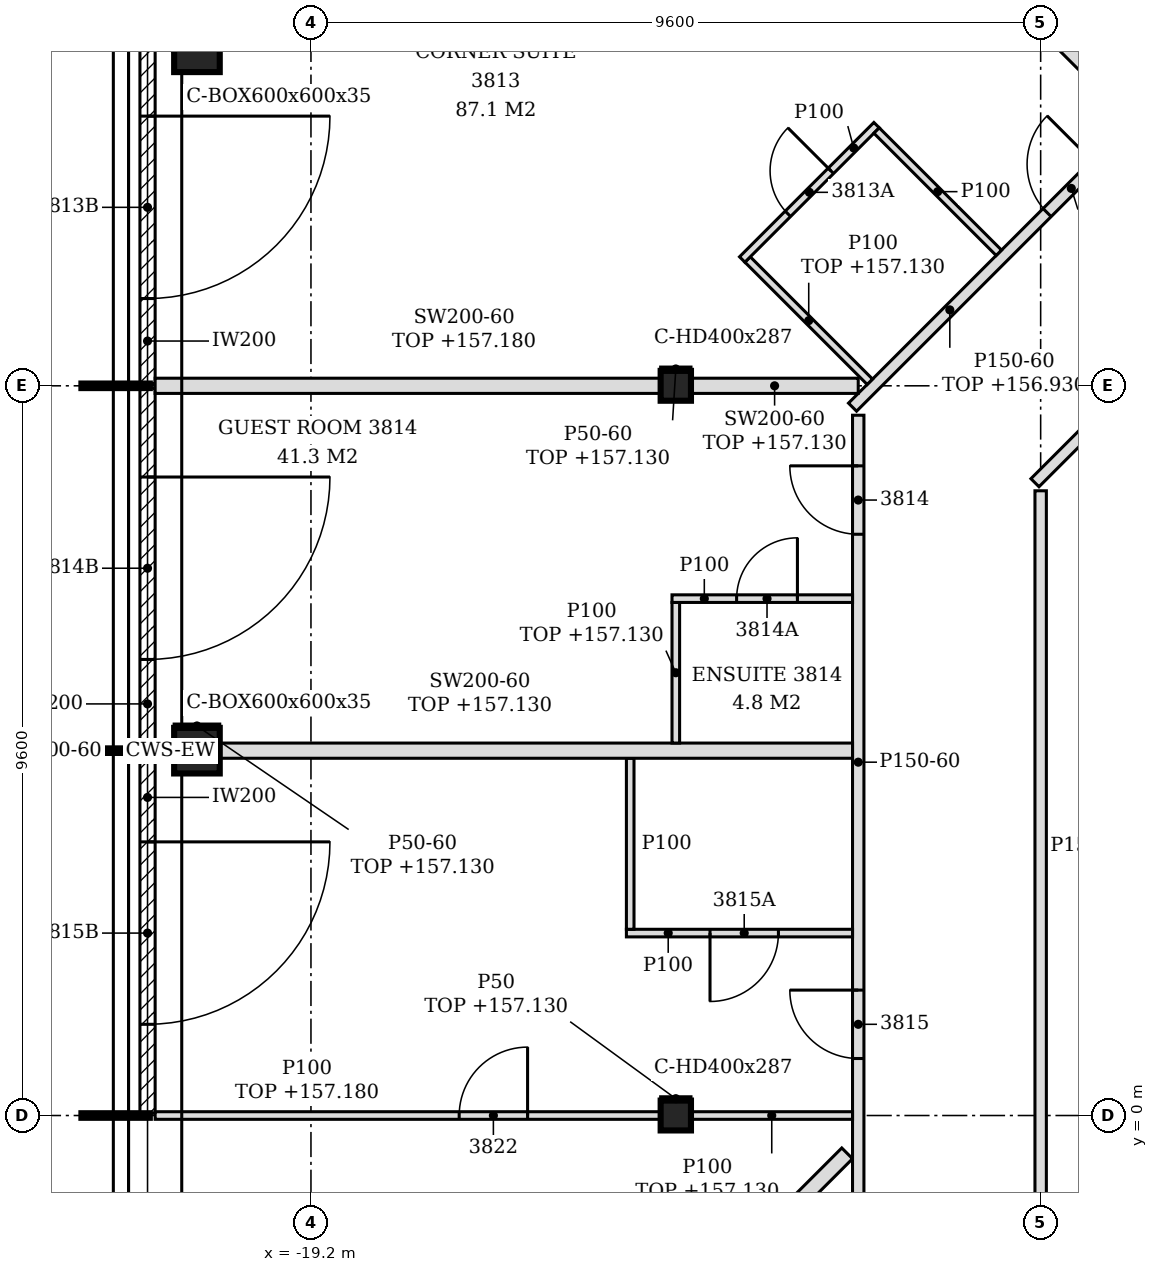
"""IFC4 building model, lengths in metres.
Left out: names, types, materials, properties, quantities, classifications, styles, units other than length and angle.
Written with IfcOpenShell. Run it as: python <this file> out.ifc"""

import sys

from ifc_helpers import new_model, si_unit, direction, frame, frame_2d, origin, origin_2d, place, context, subcontext, project, spatial, polyline, rectangle, hollow_rectangle, i_section, outline, extrude, element, fill, save


model = new_model("IFC4")
c1 = context("Model", 3, precision=1e-05, world=origin(), true_north=direction((0.0, 1.0)))
c2 = subcontext(c1, "Body", "Model", "MODEL_VIEW")
j1 = project(units=[si_unit("LENGTHUNIT", "METRE"), si_unit("PLANEANGLEUNIT", "RADIAN")], contexts=[c1])
p1 = place(None, origin())
s1 = spatial("IfcSite", under=j1, at=p1, CompositionType="ELEMENT")
p2 = place(p1, origin())
s2 = spatial("IfcBuilding", under=s1, at=p2, CompositionType="ELEMENT")
p3 = place(p2, frame((0.0, 0.0, 154.2)))
s3 = spatial("IfcBuildingStorey", under=s2, at=p3, CompositionType="ELEMENT", Elevation=154.2)
for number, where, z_axis, x_axis in (
    (1, (-20.7, 14.027, -0.15), (0.0, 0.0, 1.0), (1.0, 0.0, 0.0)),
    (2, (-20.7, 4.8, -0.15), (0.0, 0.0, 1.0), (1.0, 0.0, 0.0)),
):
    element("IfcColumn", number, at=place(p3, frame(where, z_axis=z_axis, x_axis=x_axis)), inside=s3, PredefinedType="COLUMN", context=c2, shape_type="SweptSolid", body=[
        extrude(hollow_rectangle(XDim=0.6, YDim=0.6, WallThickness=0.035, at=origin_2d()), origin(), (0.0, 0.0, 1.0), 3.6),
    ])
for number, where, z_axis, x_axis in (
    (3, (-14.4, 0.0, -0.15), (0.0, 0.0, 1.0), (1.0, 0.0, 0.0)),
    (4, (-14.4, 9.6, -0.15), (0.0, 0.0, 1.0), (1.0, 0.0, 0.0)),
):
    element("IfcColumn", number, at=place(p3, frame(where, z_axis=z_axis, x_axis=x_axis)), inside=s3, PredefinedType="COLUMN", context=c2, shape_type="SweptSolid", body=[
        extrude(i_section(OverallWidth=0.399, OverallDepth=0.393, WebThickness=0.023, FlangeThickness=0.037, FilletRadius=0.015, at=origin_2d()), origin(), (0.0, 0.0, 1.0), 3.6),
    ])
p4 = place(p3, frame((-21.35, 14.256, 0.0), z_axis=(0.0, 0.0, 1.0), x_axis=(0.0, -1.0, 0.0)))
e5 = element("IfcWall", 5, at=p4, inside=s3, PredefinedType="NOTDEFINED", context=c2, shape_type="SweptSolid", body=[
    extrude(rectangle(XDim=4.626, YDim=0.2, at=frame_2d((2.313, 0.0))), origin(), (0.0, 0.0, 1.0), 3.45),
])
p5 = place(p4, frame((1.108, 0.0, 0.0)))
e6 = element("IfcOpeningElement", 6, at=p5, cuts=e5, PredefinedType="OPENING", context=c2, shape_type="SweptSolid", body=[
    extrude(rectangle(XDim=2.4, YDim=2.4, at=frame_2d((1.2, 1.2))), frame((0.0, 0.11, 0.0), z_axis=(0.0, -1.0, 0.0), x_axis=(1.0, 0.0, 0.0)), (0.0, 0.0, 1.0), 0.22),
])
p6 = place(p3, frame((-21.35, 9.57, 0.0), z_axis=(0.0, 0.0, 1.0), x_axis=(0.0, -1.0, 0.0)))
e7 = element("IfcWall", 7, at=p6, inside=s3, PredefinedType="NOTDEFINED", context=c2, shape_type="SweptSolid", body=[
    extrude(rectangle(XDim=4.74, YDim=0.2, at=frame_2d((2.37, 0.0))), origin(), (0.0, 0.0, 1.0), 3.45),
])
p7 = place(p6, frame((1.17, 0.0, 0.0)))
e8 = element("IfcOpeningElement", 8, at=p7, cuts=e7, PredefinedType="OPENING", context=c2, shape_type="SweptSolid", body=[
    extrude(rectangle(XDim=2.4, YDim=2.4, at=frame_2d((1.2, 1.2))), frame((0.0, 0.11, 0.0), z_axis=(0.0, -1.0, 0.0), x_axis=(1.0, 0.0, 0.0)), (0.0, 0.0, 1.0), 0.22),
])
p8 = place(p3, frame((-21.35, 4.77, 0.0), z_axis=(0.0, 0.0, 1.0), x_axis=(0.0, -1.0, 0.0)))
e9 = element("IfcWall", 9, at=p8, inside=s3, PredefinedType="NOTDEFINED", context=c2, shape_type="SweptSolid", body=[
    extrude(rectangle(XDim=4.74, YDim=0.2, at=frame_2d((2.37, 0.0))), origin(), (0.0, 0.0, 1.0), 3.45),
])
p9 = place(p8, frame((1.17, 0.0, 0.0)))
e10 = element("IfcOpeningElement", 10, at=p9, cuts=e9, PredefinedType="OPENING", context=c2, shape_type="SweptSolid", body=[
    extrude(rectangle(XDim=2.4, YDim=2.4, at=frame_2d((1.2, 1.2))), frame((0.0, 0.11, 0.0), z_axis=(0.0, -1.0, 0.0), x_axis=(1.0, 0.0, 0.0)), (0.0, 0.0, 1.0), 0.22),
])
p10 = place(p3, frame((-18.755, -7.107, 0.0), z_axis=(0.0, 0.0, 1.0), x_axis=(0.707106781187, 0.707106781187, 0.0)))
e11 = element("IfcWall", 11, at=p10, inside=s3, PredefinedType="PARTITIONING", context=c2, shape_type="SweptSolid", body=[
    extrude(rectangle(XDim=9.347, YDim=0.2, at=frame_2d((4.674, 0.0))), origin(), (0.0, 0.0, 1.0), 2.93),
])
p11 = place(p3, frame((-12.0, -4.7, 0.0), z_axis=(0.0, 0.0, 1.0), x_axis=(0.0, 1.0, 0.0)))
e12 = element("IfcWall", 12, at=p11, inside=s3, PredefinedType="PARTITIONING", context=c2, shape_type="SweptSolid", body=[
    extrude(outline(polyline([(0.0, 0.0), (13.913, 0.0), (13.913, 3.45), (9.6, 3.45), (9.598, 2.93), (9.4, 2.93), (9.398, 3.45), (4.8, 3.45), (4.798, 2.93), (4.6, 2.93), (4.598, 3.45), (0.0, 3.45), (0.0, 0.0)])), frame((0.0, 0.075, 0.0), z_axis=(0.0, -1.0, 0.0), x_axis=(1.0, 0.0, 0.0)), (0.0, 0.0, 1.0), 0.15),
])
p12 = place(p11, frame((12.347, 0.0, 0.0)))
e13 = element("IfcOpeningElement", 13, at=p12, cuts=e12, PredefinedType="OPENING", context=c2, shape_type="SweptSolid", body=[
    extrude(rectangle(XDim=0.9, YDim=2.1, at=frame_2d((0.45, 1.05))), frame((0.0, 0.085, 0.0), z_axis=(0.0, -1.0, 0.0), x_axis=(1.0, 0.0, 0.0)), (0.0, 0.0, 1.0), 0.17),
])
p13 = place(p11, frame((5.45, 0.0, 0.0)))
e14 = element("IfcOpeningElement", 14, at=p13, cuts=e12, PredefinedType="OPENING", context=c2, shape_type="SweptSolid", body=[
    extrude(rectangle(XDim=0.9, YDim=2.1, at=frame_2d((0.45, 1.05))), frame((0.0, 0.085, 0.0), z_axis=(0.0, -1.0, 0.0), x_axis=(1.0, 0.0, 0.0)), (0.0, 0.0, 1.0), 0.17),
])
p14 = place(p11, frame((1.777, 0.0, 0.0)))
e15 = element("IfcOpeningElement", 15, at=p14, cuts=e12, PredefinedType="OPENING", context=c2, shape_type="SweptSolid", body=[
    extrude(rectangle(XDim=0.9, YDim=2.1, at=frame_2d((0.45, 1.05))), frame((0.0, 0.085, 0.0), z_axis=(0.0, -1.0, 0.0), x_axis=(1.0, 0.0, 0.0)), (0.0, 0.0, 1.0), 0.17),
])
p15 = place(p3, frame((-9.6, -1.125, 0.0), z_axis=(0.0, 0.0, 1.0), x_axis=(0.0, 1.0, 0.0)))
e16 = element("IfcWall", 16, at=p15, inside=s3, PredefinedType="PARTITIONING", context=c2, shape_type="SweptSolid", body=[
    extrude(outline(polyline([(0.0, 0.0), (9.344, 0.0), (9.344, 3.45), (6.025, 3.45), (6.023, 2.93), (5.825, 2.93), (5.823, 3.45), (1.225, 3.45), (1.223, 2.93), (1.025, 2.93), (1.023, 3.45), (0.0, 3.45), (0.0, 0.0)])), frame((0.0, 0.075, 0.0), z_axis=(0.0, -1.0, 0.0), x_axis=(1.0, 0.0, 0.0)), (0.0, 0.0, 1.0), 0.15),
])
p16 = place(p3, frame((-21.25, 0.0, 0.0), z_axis=(0.0, 0.0, 1.0), x_axis=(1.0, 0.0, 0.0)))
e17 = element("IfcWall", 17, at=p16, inside=s3, PredefinedType="PARTITIONING", context=c2, shape_type="SweptSolid", body=[
    extrude(outline(polyline([(0.0, 0.0), (6.65, 0.0), (6.65, 2.98), (0.7, 2.98), (0.698, 2.93), (0.4, 2.93), (0.398, 2.98), (0.0, 2.98), (0.0, 0.0)])), frame((0.0, 0.05, 0.0), z_axis=(0.0, -1.0, 0.0), x_axis=(1.0, 0.0, 0.0)), (0.0, 0.0, 1.0), 0.1),
])
p17 = place(p16, frame((4.0, 0.0, 0.0)))
e18 = element("IfcOpeningElement", 18, at=p17, cuts=e17, PredefinedType="OPENING", context=c2, shape_type="SweptSolid", body=[
    extrude(rectangle(XDim=0.9, YDim=2.1, at=frame_2d((0.45, 1.05))), frame((0.0, 0.06, 0.0), z_axis=(0.0, -1.0, 0.0), x_axis=(1.0, 0.0, 0.0)), (0.0, 0.0, 1.0), 0.12),
])
p18 = place(p3, frame((-14.2, 0.0, 0.0), z_axis=(0.0, 0.0, 1.0), x_axis=(1.0, 0.0, 0.0)))
e19 = element("IfcWall", 19, at=p18, inside=s3, PredefinedType="PARTITIONING", context=c2, shape_type="SweptSolid", body=[
    extrude(rectangle(XDim=2.125, YDim=0.1, at=frame_2d((1.063, 0.0))), origin(), (0.0, 0.0, 1.0), 2.93),
])
p19 = place(p3, frame((-15.05, 2.4, 0.0), z_axis=(0.0, 0.0, 1.0), x_axis=(1.0, 0.0, 0.0)))
e20 = element("IfcWall", 20, at=p19, inside=s3, PredefinedType="PARTITIONING", context=c2, shape_type="SweptSolid", body=[
    extrude(outline(polyline([(0.0, 0.0), (2.975, 0.0), (2.975, 3.45), (0.8, 3.45), (0.798, 2.93), (0.5, 2.93), (0.498, 3.45), (0.0, 3.45), (0.0, 0.0)])), frame((0.0, 0.05, 0.0), z_axis=(0.0, -1.0, 0.0), x_axis=(1.0, 0.0, 0.0)), (0.0, 0.0, 1.0), 0.1),
])
p20 = place(p19, frame((1.1, 0.0, 0.0)))
e21 = element("IfcOpeningElement", 21, at=p20, cuts=e20, PredefinedType="OPENING", context=c2, shape_type="SweptSolid", body=[
    extrude(rectangle(XDim=0.9, YDim=2.1, at=frame_2d((0.45, 1.05))), frame((0.0, 0.06, 0.0), z_axis=(0.0, -1.0, 0.0), x_axis=(1.0, 0.0, 0.0)), (0.0, 0.0, 1.0), 0.12),
])
p21 = place(p3, frame((-15.0, 2.45, 0.0), z_axis=(0.0, 0.0, 1.0), x_axis=(0.0, 1.0, 0.0)))
e22 = element("IfcWall", 22, at=p21, inside=s3, PredefinedType="PARTITIONING", context=c2, shape_type="SweptSolid", body=[
    extrude(rectangle(XDim=2.25, YDim=0.1, at=frame_2d((1.125, 0.0))), origin(), (0.0, 0.0, 1.0), 3.45),
])
p22 = place(p3, frame((-21.25, 4.8, 0.0), z_axis=(0.0, 0.0, 1.0), x_axis=(1.0, 0.0, 0.0)))
e23 = element("IfcWall", 23, at=p22, inside=s3, PredefinedType="PARTITIONING", context=c2, shape_type="SweptSolid", body=[
    extrude(rectangle(XDim=0.25, YDim=0.2, at=frame_2d((0.125, 0.0))), origin(), (0.0, 0.0, 1.0), 3.45),
])
p23 = place(p3, frame((-20.4, 4.8, 0.0), z_axis=(0.0, 0.0, 1.0), x_axis=(1.0, 0.0, 0.0)))
e24 = element("IfcWall", 24, at=p23, inside=s3, PredefinedType="PARTITIONING", context=c2, shape_type="SweptSolid", body=[
    extrude(rectangle(XDim=8.325, YDim=0.2, at=frame_2d((4.163, 0.0))), origin(), (0.0, 0.0, 1.0), 2.93),
])
p24 = place(p3, frame((-14.4, 4.9, 0.0), z_axis=(0.0, 0.0, 1.0), x_axis=(0.0, 1.0, 0.0)))
e25 = element("IfcWall", 25, at=p24, inside=s3, PredefinedType="PARTITIONING", context=c2, shape_type="SweptSolid", body=[
    extrude(rectangle(XDim=1.85, YDim=0.1, at=frame_2d((0.925, 0.0))), origin(), (0.0, 0.0, 1.0), 2.93),
])
p25 = place(p3, frame((-14.45, 6.8, 0.0), z_axis=(0.0, 0.0, 1.0), x_axis=(1.0, 0.0, 0.0)))
e26 = element("IfcWall", 26, at=p25, inside=s3, PredefinedType="PARTITIONING", context=c2, shape_type="SweptSolid", body=[
    extrude(outline(polyline([(0.0, 0.0), (2.375, 0.0), (2.375, 3.45), (0.2, 3.45), (0.198, 2.93), (0.0, 2.93), (0.0, 0.0)])), frame((0.0, 0.05, 0.0), z_axis=(0.0, -1.0, 0.0), x_axis=(1.0, 0.0, 0.0)), (0.0, 0.0, 1.0), 0.1),
])
p26 = place(p25, frame((0.85, 0.0, 0.0)))
e27 = element("IfcOpeningElement", 27, at=p26, cuts=e26, PredefinedType="OPENING", context=c2, shape_type="SweptSolid", body=[
    extrude(rectangle(XDim=0.8, YDim=2.1, at=frame_2d((0.4, 1.05))), frame((0.0, 0.06, 0.0), z_axis=(0.0, -1.0, 0.0), x_axis=(1.0, 0.0, 0.0)), (0.0, 0.0, 1.0), 0.12),
])
p27 = place(p3, frame((-9.675, 8.325, 0.0), z_axis=(0.0, 0.0, 1.0), x_axis=(0.707106781187, 0.707106781187, 0.0)))
e28 = element("IfcWall", 28, at=p27, inside=s3, PredefinedType="PARTITIONING", context=c2, shape_type="SweptSolid", body=[
    extrude(rectangle(XDim=6.614, YDim=0.15, at=frame_2d((3.307, 0.0))), origin(), (0.0, 0.0, 1.0), 2.93),
])
p28 = place(p3, frame((-12.075, 9.319, 0.0), z_axis=(0.0, 0.0, 1.0), x_axis=(0.707106781187, 0.707106781187, 0.0)))
e29 = element("IfcWall", 29, at=p28, inside=s3, PredefinedType="PARTITIONING", context=c2, shape_type="SweptSolid", body=[
    extrude(rectangle(XDim=13.793, YDim=0.15, at=frame_2d((6.896, 0.0))), origin(), (0.0, 0.0, 1.0), 2.73),
])
p29 = place(p28, frame((11.692, 0.0, 0.0)))
e30 = element("IfcOpeningElement", 30, at=p29, cuts=e29, PredefinedType="OPENING", context=c2, shape_type="SweptSolid", body=[
    extrude(rectangle(XDim=0.9, YDim=2.1, at=frame_2d((0.45, 1.05))), frame((0.0, 0.085, 0.0), z_axis=(0.0, -1.0, 0.0), x_axis=(1.0, 0.0, 0.0)), (0.0, 0.0, 1.0), 0.17),
])
p30 = place(p28, frame((7.376, 0.0, 0.0)))
e31 = element("IfcOpeningElement", 31, at=p30, cuts=e29, PredefinedType="OPENING", context=c2, shape_type="SweptSolid", body=[
    extrude(rectangle(XDim=0.9, YDim=2.1, at=frame_2d((0.45, 1.05))), frame((0.0, 0.085, 0.0), z_axis=(0.0, -1.0, 0.0), x_axis=(1.0, 0.0, 0.0)), (0.0, 0.0, 1.0), 0.17),
])
p31 = place(p28, frame((3.62, 0.0, 0.0)))
e32 = element("IfcOpeningElement", 32, at=p31, cuts=e29, PredefinedType="OPENING", context=c2, shape_type="SweptSolid", body=[
    extrude(rectangle(XDim=0.9, YDim=2.1, at=frame_2d((0.45, 1.05))), frame((0.0, 0.085, 0.0), z_axis=(0.0, -1.0, 0.0), x_axis=(1.0, 0.0, 0.0)), (0.0, 0.0, 1.0), 0.17),
])
p32 = place(p3, frame((-21.25, 9.6, 0.0), z_axis=(0.0, 0.0, 1.0), x_axis=(1.0, 0.0, 0.0)))
e33 = element("IfcWall", 33, at=p32, inside=s3, PredefinedType="PARTITIONING", context=c2, shape_type="SweptSolid", body=[
    extrude(outline(polyline([(0.0, 0.0), (6.65, 0.0), (6.65, 2.98), (0.7, 2.98), (0.698, 2.93), (0.4, 2.93), (0.398, 2.98), (0.0, 2.98), (0.0, 0.0)])), frame((0.0, 0.1, 0.0), z_axis=(0.0, -1.0, 0.0), x_axis=(1.0, 0.0, 0.0)), (0.0, 0.0, 1.0), 0.2),
])
p33 = place(p3, frame((-14.2, 9.6, 0.0), z_axis=(0.0, 0.0, 1.0), x_axis=(1.0, 0.0, 0.0)))
e34 = element("IfcWall", 34, at=p33, inside=s3, PredefinedType="PARTITIONING", context=c2, shape_type="SweptSolid", body=[
    extrude(rectangle(XDim=2.2, YDim=0.2, at=frame_2d((1.1, 0.0))), origin(), (0.0, 0.0, 1.0), 2.93),
])
p34 = place(p3, frame((-11.847, 9.653, 0.0), z_axis=(0.0, 0.0, 1.0), x_axis=(-0.707106781187, 0.707106781187, 0.0)))
e35 = element("IfcWall", 35, at=p34, inside=s3, PredefinedType="PARTITIONING", context=c2, shape_type="SweptSolid", body=[
    extrude(rectangle(XDim=2.275, YDim=0.1, at=frame_2d((1.137, 0.0))), origin(), (0.0, 0.0, 1.0), 2.93),
])
p35 = place(p3, frame((-13.526, 11.262, 0.0), z_axis=(0.0, 0.0, 1.0), x_axis=(0.707106781187, 0.707106781187, 0.0)))
e36 = element("IfcWall", 36, at=p35, inside=s3, PredefinedType="PARTITIONING", context=c2, shape_type="SweptSolid", body=[
    extrude(rectangle(XDim=2.5, YDim=0.1, at=frame_2d((1.25, 0.0))), origin(), (0.0, 0.0, 1.0), 3.45),
])
p36 = place(p35, frame((0.85, 0.0, 0.0)))
e37 = element("IfcOpeningElement", 37, at=p36, cuts=e36, PredefinedType="OPENING", context=c2, shape_type="SweptSolid", body=[
    extrude(rectangle(XDim=0.8, YDim=2.1, at=frame_2d((0.4, 1.05))), frame((0.0, 0.06, 0.0), z_axis=(0.0, -1.0, 0.0), x_axis=(1.0, 0.0, 0.0)), (0.0, 0.0, 1.0), 0.12),
])
p37 = place(p3, frame((-10.15, 11.35, 0.0), z_axis=(0.0, 0.0, 1.0), x_axis=(-0.707160441348, 0.707053116953, 0.0)))
e38 = element("IfcWall", 38, at=p37, inside=s3, PredefinedType="PARTITIONING", context=c2, shape_type="SweptSolid", body=[
    extrude(rectangle(XDim=2.275, YDim=0.1, at=frame_2d((1.137, 0.0))), origin(), (0.0, 0.0, 1.0), 3.45),
])
p38 = place(p3, frame((-8.35, 13.15, 0.0), z_axis=(0.0, 0.0, 1.0), x_axis=(-0.707092030896, 0.707121531169, 0.0)))
e39 = element("IfcWall", 39, at=p38, inside=s3, PredefinedType="PARTITIONING", context=c2, shape_type="SweptSolid", body=[
    extrude(rectangle(XDim=8.276, YDim=0.2, at=frame_2d((4.138, 0.0))), origin(), (0.0, 0.0, 1.0), 2.93),
])
p39 = place(p3, frame((-14.6, 0.221, 0.0), z_axis=(0.0, 0.0, 1.0), x_axis=(1.0, 0.0, 0.0)))
e40 = element("IfcWall", 40, at=p39, inside=s3, PredefinedType="PARTITIONING", context=c2, shape_type="SweptSolid", body=[
    extrude(rectangle(XDim=0.399, YDim=0.05, at=frame_2d((0.2, 0.0))), origin(), (0.0, 0.0, 1.0), 2.93),
])
p40 = place(p3, frame((-21.0, 5.125, 0.0), z_axis=(0.0, 0.0, 1.0), x_axis=(1.0, 0.0, 0.0)))
e41 = element("IfcWall", 41, at=p40, inside=s3, PredefinedType="PARTITIONING", context=c2, shape_type="SweptSolid", body=[
    extrude(rectangle(XDim=0.6, YDim=0.05, at=frame_2d((0.3, 0.0))), origin(), (0.0, 0.0, 1.0), 2.93),
])
p41 = place(p3, frame((-14.6, 9.822, 0.0), z_axis=(0.0, 0.0, 1.0), x_axis=(1.0, 0.0, 0.0)))
e42 = element("IfcWall", 42, at=p41, inside=s3, PredefinedType="PARTITIONING", context=c2, shape_type="SweptSolid", body=[
    extrude(rectangle(XDim=0.399, YDim=0.05, at=frame_2d((0.2, 0.0))), origin(), (0.0, 0.0, 1.0), 2.93),
])
p42 = place(p5, origin())
e43 = element("IfcDoor", 43, at=p42, inside=s3, OperationType="SINGLE_SWING_LEFT", PredefinedType="DOOR", context=c2, shape_type="SweptSolid", body=[
    extrude(rectangle(XDim=2.4, YDim=2.4, at=frame_2d((1.2, 1.2))), frame((0.0, 0.025, 0.0), z_axis=(0.0, -1.0, 0.0), x_axis=(1.0, 0.0, 0.0)), (0.0, 0.0, 1.0), 0.05),
])
fill(e6, e43)
p43 = place(p7, origin())
e44 = element("IfcDoor", 44, at=p43, inside=s3, OperationType="SINGLE_SWING_LEFT", PredefinedType="DOOR", context=c2, shape_type="SweptSolid", body=[
    extrude(rectangle(XDim=2.4, YDim=2.4, at=frame_2d((1.2, 1.2))), frame((0.0, 0.025, 0.0), z_axis=(0.0, -1.0, 0.0), x_axis=(1.0, 0.0, 0.0)), (0.0, 0.0, 1.0), 0.05),
])
fill(e8, e44)
p44 = place(p9, origin())
e45 = element("IfcDoor", 45, at=p44, inside=s3, OperationType="SINGLE_SWING_LEFT", PredefinedType="DOOR", context=c2, shape_type="SweptSolid", body=[
    extrude(rectangle(XDim=2.4, YDim=2.4, at=frame_2d((1.2, 1.2))), frame((0.0, 0.025, 0.0), z_axis=(0.0, -1.0, 0.0), x_axis=(1.0, 0.0, 0.0)), (0.0, 0.0, 1.0), 0.05),
])
fill(e10, e45)
p45 = place(p31, origin())
e46 = element("IfcDoor", 46, at=p45, inside=s3, OperationType="SINGLE_SWING_RIGHT", PredefinedType="DOOR", context=c2, shape_type="SweptSolid", body=[
    extrude(rectangle(XDim=0.9, YDim=2.1, at=frame_2d((0.45, 1.05))), frame((0.0, 0.025, 0.0), z_axis=(0.0, -1.0, 0.0), x_axis=(1.0, 0.0, 0.0)), (0.0, 0.0, 1.0), 0.05),
])
fill(e32, e46)
p46 = place(p36, origin())
e47 = element("IfcDoor", 47, at=p46, inside=s3, OperationType="SINGLE_SWING_RIGHT", PredefinedType="DOOR", context=c2, shape_type="SweptSolid", body=[
    extrude(rectangle(XDim=0.8, YDim=2.1, at=frame_2d((0.4, 1.05))), frame((0.0, 0.025, 0.0), z_axis=(0.0, -1.0, 0.0), x_axis=(1.0, 0.0, 0.0)), (0.0, 0.0, 1.0), 0.05),
])
fill(e37, e47)
p47 = place(p12, origin())
e48 = element("IfcDoor", 48, at=p47, inside=s3, OperationType="SINGLE_SWING_RIGHT", PredefinedType="DOOR", context=c2, shape_type="SweptSolid", body=[
    extrude(rectangle(XDim=0.9, YDim=2.1, at=frame_2d((0.45, 1.05))), frame((0.0, 0.025, 0.0), z_axis=(0.0, -1.0, 0.0), x_axis=(1.0, 0.0, 0.0)), (0.0, 0.0, 1.0), 0.05),
])
fill(e13, e48)
p48 = place(p26, origin())
e49 = element("IfcDoor", 49, at=p48, inside=s3, OperationType="SINGLE_SWING_RIGHT", PredefinedType="DOOR", context=c2, shape_type="SweptSolid", body=[
    extrude(rectangle(XDim=0.8, YDim=2.1, at=frame_2d((0.4, 1.05))), frame((0.0, 0.025, 0.0), z_axis=(0.0, -1.0, 0.0), x_axis=(1.0, 0.0, 0.0)), (0.0, 0.0, 1.0), 0.05),
])
fill(e27, e49)
p49 = place(p13, origin())
e50 = element("IfcDoor", 50, at=p49, inside=s3, OperationType="SINGLE_SWING_RIGHT", PredefinedType="DOOR", context=c2, shape_type="SweptSolid", body=[
    extrude(rectangle(XDim=0.9, YDim=2.1, at=frame_2d((0.45, 1.05))), frame((0.0, 0.025, 0.0), z_axis=(0.0, -1.0, 0.0), x_axis=(1.0, 0.0, 0.0)), (0.0, 0.0, 1.0), 0.05),
])
fill(e14, e50)
p50 = place(p20, frame((0.9, 0.0, 0.0), z_axis=(0.0, 0.0, 1.0), x_axis=(-1.0, 0.0, 0.0)))
e51 = element("IfcDoor", 51, at=p50, inside=s3, OperationType="SINGLE_SWING_RIGHT", PredefinedType="DOOR", context=c2, shape_type="SweptSolid", body=[
    extrude(rectangle(XDim=0.9, YDim=2.1, at=frame_2d((0.45, 1.05))), frame((0.0, 0.025, 0.0), z_axis=(0.0, -1.0, 0.0), x_axis=(1.0, 0.0, 0.0)), (0.0, 0.0, 1.0), 0.05),
])
fill(e21, e51)
p51 = place(p17, origin())
e52 = element("IfcDoor", 52, at=p51, inside=s3, OperationType="SINGLE_SWING_RIGHT", PredefinedType="DOOR", context=c2, shape_type="SweptSolid", body=[
    extrude(rectangle(XDim=0.9, YDim=2.1, at=frame_2d((0.45, 1.05))), frame((0.0, 0.025, 0.0), z_axis=(0.0, -1.0, 0.0), x_axis=(1.0, 0.0, 0.0)), (0.0, 0.0, 1.0), 0.05),
])
fill(e18, e52)
save(model, sys.argv[1])
